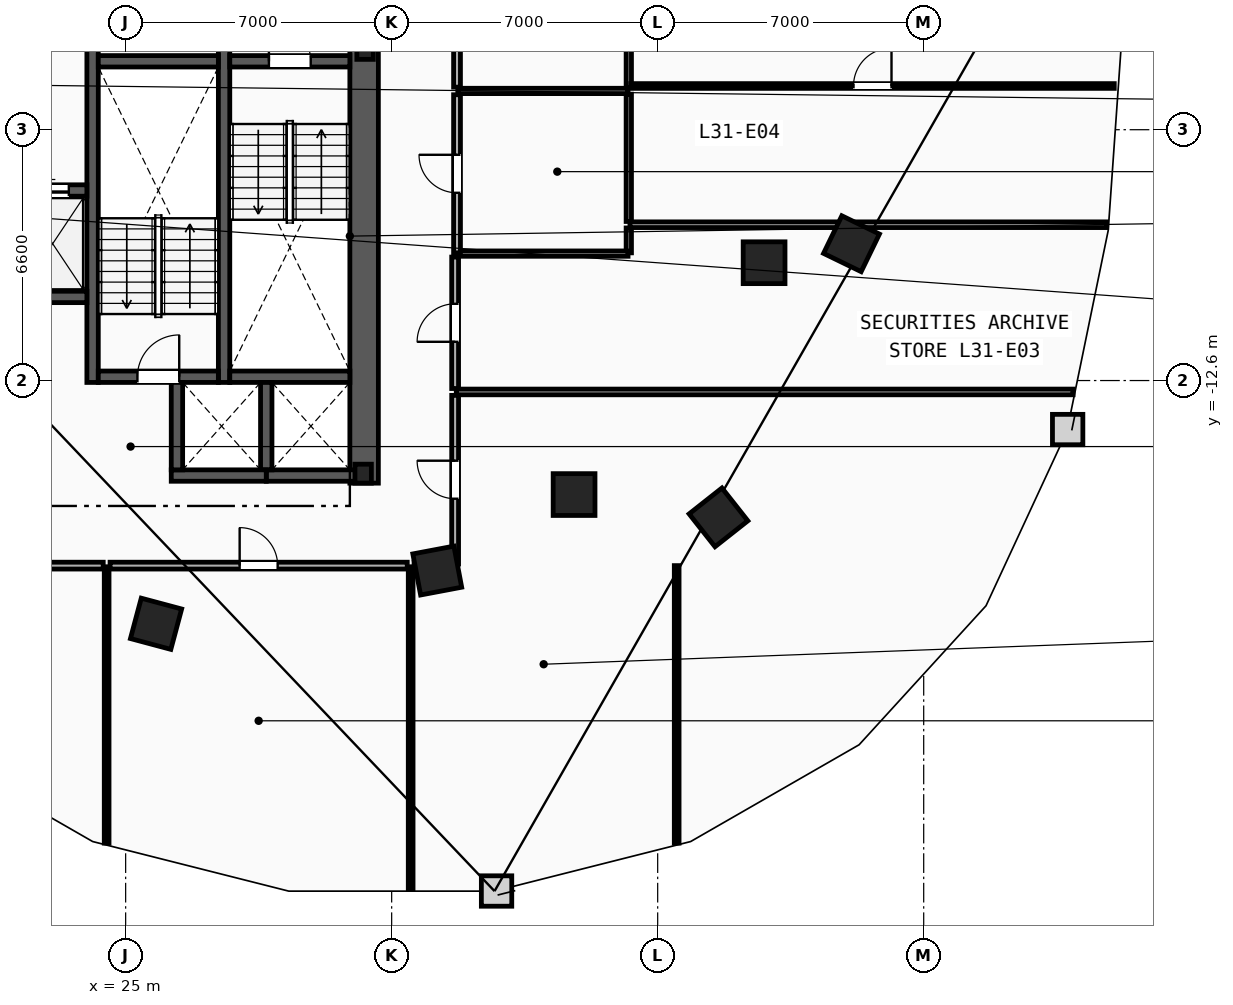
"""IFC4 building model, lengths in metres.
Left out: names, types, materials, properties, quantities, classifications, styles, units other than length and angle.
Written with IfcOpenShell. Run it as: python <this file> out.ifc"""

import sys

from ifc_helpers import new_model, si_unit, direction, frame, frame_2d, origin, origin_2d, place, context, subcontext, project, spatial, rectangle, i_section, extrude, element, fill, save


model = new_model("IFC4")
c1 = context("Model", 3, precision=1e-05, world=origin(), true_north=direction((0.0, 1.0)))
c2 = subcontext(c1, "Body", "Model", "MODEL_VIEW")
j1 = project(units=[si_unit("LENGTHUNIT", "METRE"), si_unit("PLANEANGLEUNIT", "RADIAN")], contexts=[c1])
p1 = place(None, origin())
s1 = spatial("IfcSite", under=j1, at=p1, CompositionType="ELEMENT")
p2 = place(p1, origin())
s2 = spatial("IfcBuilding", under=s1, at=p2, CompositionType="ELEMENT")
p3 = place(p2, frame((0.0, 0.0, 121.4)))
s3 = spatial("IfcBuildingStorey", under=s2, at=p3, CompositionType="ELEMENT", Elevation=121.4)
for number, where, z_axis, x_axis in (
    (1, (31.3, -3.9, 0.0), (0.0, 0.0, 1.0), (1.0, 0.0, 0.0)),
    (2, (31.25, -15.05, 0.0), (0.0, 0.0, 1.0), (1.0, 0.0, 0.0)),
):
    element("IfcColumn", number, at=place(p3, frame(where, z_axis=z_axis, x_axis=x_axis)), inside=s3, PredefinedType="COLUMN", context=c2, shape_type="SweptSolid", body=[
        extrude(i_section(OverallWidth=0.432, OverallDepth=0.498, WebThickness=0.056, FlangeThickness=0.089, FilletRadius=0.018, at=origin_2d()), origin(), (0.0, 0.0, 1.0), 3.6),
    ])
for number, where, z_axis, x_axis in (
    (3, (41.8, -9.5, 0.0), (0.0, 0.0, 1.0), (1.0, 0.0, 0.0)),
    (4, (36.8, -15.6, 0.0), (0.0, 0.0, 1.0), (1.0, 0.0, 0.0)),
    (5, (25.8, -19.0, 0.0), (0.0, 0.0, 1.0), (0.966, -0.259, 0.0)),
    (6, (33.2, -17.6, 0.0), (0.0, 0.0, 1.0), (0.983, 0.186, 0.0)),
    (7, (40.6, -16.2, 0.0), (0.0, 0.0, 1.0), (0.785, 0.619, 0.0)),
    (8, (44.1, -9.0, 0.0), (0.0, 0.0, 1.0), (0.437, 0.899, 0.0)),
):
    element("IfcColumn", number, at=place(p3, frame(where, z_axis=z_axis, x_axis=x_axis)), inside=s3, PredefinedType="COLUMN", context=c2, shape_type="SweptSolid", body=[
        extrude(rectangle(XDim=1.1, YDim=1.1, at=origin_2d()), origin(), (0.0, 0.0, 1.0), 3.6),
    ])
p4 = place(p3, frame((31.275, -15.3, 0.0), z_axis=(0.0, 0.0, 1.0), x_axis=(0.0, 1.0, 0.0)))
e9 = element("IfcWall", 9, at=p4, inside=s3, PredefinedType="SHEAR", context=c2, shape_type="SweptSolid", body=[
    extrude(rectangle(XDim=13.33, YDim=0.75, at=frame_2d((6.665, 0.0))), origin(), (0.0, 0.0, 1.0), 3.3),
])
for number, where, z_axis, x_axis in (
    (10, (27.59, -12.65, 0.0), (0.0, 0.0, 1.0), (0.0, 1.0, 0.0)),
    (11, (24.13, -12.65, 0.0), (0.0, 0.0, 1.0), (0.0, 1.0, 0.0)),
):
    element("IfcWall", number, at=place(p3, frame(where, z_axis=z_axis, x_axis=x_axis)), inside=s3, PredefinedType="SHEAR", context=c2, shape_type="SweptSolid", body=[
        extrude(rectangle(XDim=10.68, YDim=0.3, at=frame_2d((5.34, 0.0))), origin(), (0.0, 0.0, 1.0), 3.3),
    ])
p5 = place(p3, frame((27.74, -4.2, 0.0), z_axis=(0.0, 0.0, 1.0), x_axis=(1.0, 0.0, 0.0)))
e12 = element("IfcWall", 12, at=p5, inside=s3, PredefinedType="SHEAR", context=c2, shape_type="SweptSolid", body=[
    extrude(rectangle(XDim=3.16, YDim=0.3, at=frame_2d((1.58, 0.0))), origin(), (0.0, 0.0, 1.0), 3.3),
])
p6 = place(p5, frame((1.03, 0.0, 0.0)))
e13 = element("IfcOpeningElement", 13, at=p6, cuts=e12, PredefinedType="OPENING", context=c2, shape_type="SweptSolid", body=[
    extrude(rectangle(XDim=1.1, YDim=2.15, at=frame_2d((0.55, 1.075))), frame((0.0, 0.16, 0.0), z_axis=(0.0, -1.0, 0.0), x_axis=(1.0, 0.0, 0.0)), (0.0, 0.0, 1.0), 0.32),
])
p7 = place(p3, frame((27.74, -12.5, 0.0), z_axis=(0.0, 0.0, 1.0), x_axis=(1.0, 0.0, 0.0)))
e14 = element("IfcWall", 14, at=p7, inside=s3, PredefinedType="SHEAR", context=c2, shape_type="SweptSolid", body=[
    extrude(rectangle(XDim=3.16, YDim=0.3, at=frame_2d((1.58, 0.0))), origin(), (0.0, 0.0, 1.0), 3.3),
])
p8 = place(p3, frame((24.28, -12.5, 0.0), z_axis=(0.0, 0.0, 1.0), x_axis=(1.0, 0.0, 0.0)))
e15 = element("IfcWall", 15, at=p8, inside=s3, PredefinedType="SHEAR", context=c2, shape_type="SweptSolid", body=[
    extrude(rectangle(XDim=3.16, YDim=0.3, at=frame_2d((1.58, 0.0))), origin(), (0.0, 0.0, 1.0), 3.3),
])
p9 = place(p8, frame((1.03, 0.0, 0.0)))
e16 = element("IfcOpeningElement", 16, at=p9, cuts=e15, PredefinedType="OPENING", context=c2, shape_type="SweptSolid", body=[
    extrude(rectangle(XDim=1.1, YDim=2.15, at=frame_2d((0.55, 1.075))), frame((0.0, 0.16, 0.0), z_axis=(0.0, -1.0, 0.0), x_axis=(1.0, 0.0, 0.0)), (0.0, 0.0, 1.0), 0.32),
])
p10 = place(p3, frame((24.28, -4.2, 0.0), z_axis=(0.0, 0.0, 1.0), x_axis=(1.0, 0.0, 0.0)))
e17 = element("IfcWall", 17, at=p10, inside=s3, PredefinedType="SHEAR", context=c2, shape_type="SweptSolid", body=[
    extrude(rectangle(XDim=3.16, YDim=0.3, at=frame_2d((1.58, 0.0))), origin(), (0.0, 0.0, 1.0), 3.3),
])
p11 = place(p3, frame((21.88, -7.6, 0.0), z_axis=(0.0, 0.0, 1.0), x_axis=(1.0, 0.0, 0.0)))
e18 = element("IfcWall", 18, at=p11, inside=s3, PredefinedType="SHEAR", context=c2, shape_type="SweptSolid", body=[
    extrude(rectangle(XDim=2.1, YDim=0.3, at=frame_2d((1.05, 0.0))), origin(), (0.0, 0.0, 1.0), 3.3),
])
p12 = place(p11, frame((0.475, 0.0, 0.0)))
e19 = element("IfcOpeningElement", 19, at=p12, cuts=e18, PredefinedType="OPENING", context=c2, shape_type="SweptSolid", body=[
    extrude(rectangle(XDim=1.15, YDim=2.2, at=frame_2d((0.575, 1.1))), frame((0.0, 0.16, 0.0), z_axis=(0.0, -1.0, 0.0), x_axis=(1.0, 0.0, 0.0)), (0.0, 0.0, 1.0), 0.32),
])
p13 = place(p3, frame((21.88, -10.4, 0.0), z_axis=(0.0, 0.0, 1.0), x_axis=(1.0, 0.0, 0.0)))
e20 = element("IfcWall", 20, at=p13, inside=s3, PredefinedType="SHEAR", context=c2, shape_type="SweptSolid", body=[
    extrude(rectangle(XDim=2.1, YDim=0.3, at=frame_2d((1.05, 0.0))), origin(), (0.0, 0.0, 1.0), 3.3),
])
p14 = place(p3, frame((28.7, -15.1, 0.0), z_axis=(0.0, 0.0, 1.0), x_axis=(1.0, 0.0, 0.0)))
e21 = element("IfcWall", 21, at=p14, inside=s3, PredefinedType="SHEAR", context=c2, shape_type="SweptSolid", body=[
    extrude(rectangle(XDim=2.5, YDim=0.3, at=frame_2d((1.25, 0.0))), origin(), (0.0, 0.0, 1.0), 3.3),
])
p15 = place(p3, frame((28.7, -14.95, 0.0), z_axis=(0.0, 0.0, 1.0), x_axis=(0.0, 1.0, 0.0)))
e22 = element("IfcWall", 22, at=p15, inside=s3, PredefinedType="SHEAR", context=c2, shape_type="SweptSolid", body=[
    extrude(rectangle(XDim=2.3, YDim=0.3, at=frame_2d((1.15, 0.0))), origin(), (0.0, 0.0, 1.0), 3.3),
])
p16 = place(p3, frame((26.2, -15.1, 0.0), z_axis=(0.0, 0.0, 1.0), x_axis=(1.0, 0.0, 0.0)))
e23 = element("IfcWall", 23, at=p16, inside=s3, PredefinedType="SHEAR", context=c2, shape_type="SweptSolid", body=[
    extrude(rectangle(XDim=2.5, YDim=0.3, at=frame_2d((1.25, 0.0))), origin(), (0.0, 0.0, 1.0), 3.3),
])
p17 = place(p3, frame((26.35, -14.95, 0.0), z_axis=(0.0, 0.0, 1.0), x_axis=(0.0, 1.0, 0.0)))
e24 = element("IfcWall", 24, at=p17, inside=s3, PredefinedType="SHEAR", context=c2, shape_type="SweptSolid", body=[
    extrude(rectangle(XDim=2.3, YDim=0.3, at=frame_2d((1.15, 0.0))), origin(), (0.0, 0.0, 1.0), 3.3),
])
p18 = place(p3, frame((38.24, -9.24, 0.0), z_axis=(0.0, 0.0, 1.0), x_axis=(0.0, 1.0, 0.0)))
e25 = element("IfcWall", 25, at=p18, inside=s3, PredefinedType="PARTITIONING", context=c2, shape_type="SweptSolid", body=[
    extrude(rectangle(XDim=0.655, YDim=0.14, at=frame_2d((0.328, 0.0))), origin(), (0.0, 0.0, 1.0), 3.3),
])
p19 = place(p3, frame((38.24, -8.415, 0.0), z_axis=(0.0, 0.0, 1.0), x_axis=(0.0, 1.0, 0.0)))
e26 = element("IfcWall", 26, at=p19, inside=s3, PredefinedType="PARTITIONING", context=c2, shape_type="SweptSolid", body=[
    extrude(rectangle(XDim=3.35, YDim=0.14, at=frame_2d((1.675, 0.0))), origin(), (0.0, 0.0, 1.0), 3.3),
])
p20 = place(p3, frame((38.24, -4.895, 0.0), z_axis=(0.0, 0.0, 1.0), x_axis=(0.0, 1.0, 0.0)))
e27 = element("IfcWall", 27, at=p20, inside=s3, PredefinedType="PARTITIONING", context=c2, shape_type="SweptSolid", body=[
    extrude(rectangle(XDim=4.275, YDim=0.14, at=frame_2d((2.137, 0.0))), origin(), (0.0, 0.0, 1.0), 3.3),
])
for number, where, z_axis, x_axis in (
    (28, (33.74, -4.98, 0.0), (0.0, 0.0, 1.0), (1.0, 0.0, 0.0)),
    (29, (33.74, -9.26, 0.0), (0.0, 0.0, 1.0), (1.0, 0.0, 0.0)),
):
    element("IfcWall", number, at=place(p3, frame(where, z_axis=z_axis, x_axis=x_axis)), inside=s3, PredefinedType="PARTITIONING", context=c2, shape_type="SweptSolid", body=[
        extrude(rectangle(XDim=4.48, YDim=0.14, at=frame_2d((2.24, 0.0))), origin(), (0.0, 0.0, 1.0), 3.3),
    ])
p21 = place(p3, frame((33.72, -4.88, 0.0), z_axis=(0.0, 0.0, 1.0), x_axis=(0.0, 1.0, 0.0)))
e30 = element("IfcWall", 30, at=p21, inside=s3, PredefinedType="PARTITIONING", context=c2, shape_type="SweptSolid", body=[
    extrude(rectangle(XDim=4.26, YDim=0.18, at=frame_2d((2.13, 0.0))), origin(), (0.0, 0.0, 1.0), 3.3),
])
p22 = place(p21, frame((1.655, 0.0, 0.0)))
e31 = element("IfcOpeningElement", 31, at=p22, cuts=e30, PredefinedType="OPENING", context=c2, shape_type="SweptSolid", body=[
    extrude(rectangle(XDim=0.95, YDim=2.1, at=frame_2d((0.475, 1.05))), frame((0.0, 0.1, 0.0), z_axis=(0.0, -1.0, 0.0), x_axis=(1.0, 0.0, 0.0)), (0.0, 0.0, 1.0), 0.2),
])
p23 = place(p3, frame((33.72, -9.24, 0.0), z_axis=(0.0, 0.0, 1.0), x_axis=(0.0, 1.0, 0.0)))
e32 = element("IfcWall", 32, at=p23, inside=s3, PredefinedType="PARTITIONING", context=c2, shape_type="SweptSolid", body=[
    extrude(rectangle(XDim=4.16, YDim=0.18, at=frame_2d((2.08, 0.0))), origin(), (0.0, 0.0, 1.0), 3.3),
])
p24 = place(p23, frame((1.58, 0.0, 0.0)))
e33 = element("IfcOpeningElement", 33, at=p24, cuts=e32, PredefinedType="OPENING", context=c2, shape_type="SweptSolid", body=[
    extrude(rectangle(XDim=1.0, YDim=2.15, at=frame_2d((0.5, 1.075))), frame((0.0, 0.1, 0.0), z_axis=(0.0, -1.0, 0.0), x_axis=(1.0, 0.0, 0.0)), (0.0, 0.0, 1.0), 0.2),
])
p25 = place(p3, frame((38.27, -8.5, 0.0), z_axis=(0.0, 0.0, 1.0), x_axis=(1.0, 0.0, 0.0)))
e34 = element("IfcWall", 34, at=p25, inside=s3, PredefinedType="PARTITIONING", context=c2, shape_type="SweptSolid", body=[
    extrude(rectangle(XDim=12.546, YDim=0.15, at=frame_2d((6.273, 0.0))), origin(), (0.0, 0.0, 1.0), 3.3),
])
p26 = place(p3, frame((33.7, -12.9, 0.0), z_axis=(0.0, 0.0, 1.0), x_axis=(1.0, 0.0, 0.0)))
e35 = element("IfcWall", 35, at=p26, inside=s3, PredefinedType="PARTITIONING", context=c2, shape_type="SweptSolid", body=[
    extrude(rectangle(XDim=16.231, YDim=0.15, at=frame_2d((8.115, 0.0))), origin(), (0.0, 0.0, 1.0), 3.3),
])
p27 = place(p3, frame((24.5, -24.772, 0.0), z_axis=(0.0, 0.0, 1.0), x_axis=(0.0, 1.0, 0.0)))
e36 = element("IfcWall", 36, at=p27, inside=s3, PredefinedType="PARTITIONING", context=c2, shape_type="SweptSolid", body=[
    extrude(rectangle(XDim=7.272, YDim=0.125, at=frame_2d((3.636, 0.0))), origin(), (0.0, 0.0, 1.0), 3.3),
])
p28 = place(p3, frame((32.5, -25.985, 0.0), z_axis=(0.0, 0.0, 1.0), x_axis=(0.0, 1.0, 0.0)))
e37 = element("IfcWall", 37, at=p28, inside=s3, PredefinedType="PARTITIONING", context=c2, shape_type="SweptSolid", body=[
    extrude(rectangle(XDim=8.485, YDim=0.125, at=frame_2d((4.243, 0.0))), origin(), (0.0, 0.0, 1.0), 3.3),
])
p29 = place(p3, frame((39.5, -24.772, 0.0), z_axis=(0.0, 0.0, 1.0), x_axis=(0.0, 1.0, 0.0)))
e38 = element("IfcWall", 38, at=p29, inside=s3, PredefinedType="PARTITIONING", context=c2, shape_type="SweptSolid", body=[
    extrude(rectangle(XDim=7.302, YDim=0.125, at=frame_2d((3.651, 0.0))), origin(), (0.0, 0.0, 1.0), 3.3),
])
p30 = place(p3, frame((24.59, -17.47, 0.0), z_axis=(0.0, 0.0, 1.0), x_axis=(1.0, 0.0, 0.0)))
e39 = element("IfcWall", 39, at=p30, inside=s3, PredefinedType="PARTITIONING", context=c2, shape_type="SweptSolid", body=[
    extrude(rectangle(XDim=7.82, YDim=0.18, at=frame_2d((3.91, 0.0))), origin(), (0.0, 0.0, 1.0), 3.3),
])
p31 = place(p30, frame((3.41, 0.0, 0.0)))
e40 = element("IfcOpeningElement", 40, at=p31, cuts=e39, PredefinedType="OPENING", context=c2, shape_type="SweptSolid", body=[
    extrude(rectangle(XDim=1.0, YDim=2.15, at=frame_2d((0.5, 1.075))), frame((0.0, 0.1, 0.0), z_axis=(0.0, -1.0, 0.0), x_axis=(1.0, 0.0, 0.0)), (0.0, 0.0, 1.0), 0.2),
])
p32 = place(p3, frame((33.67, -17.428, 0.0), z_axis=(0.0, 0.0, 1.0), x_axis=(0.0, 1.0, 0.0)))
e41 = element("IfcWall", 41, at=p32, inside=s3, PredefinedType="PARTITIONING", context=c2, shape_type="SweptSolid", body=[
    extrude(rectangle(XDim=4.438, YDim=0.18, at=frame_2d((2.219, 0.0))), origin(), (0.0, 0.0, 1.0), 3.3),
])
p33 = place(p32, frame((1.719, 0.0, 0.0)))
e42 = element("IfcOpeningElement", 42, at=p33, cuts=e41, PredefinedType="OPENING", context=c2, shape_type="SweptSolid", body=[
    extrude(rectangle(XDim=1.0, YDim=2.15, at=frame_2d((0.5, 1.075))), frame((0.0, 0.1, 0.0), z_axis=(0.0, -1.0, 0.0), x_axis=(1.0, 0.0, 0.0)), (0.0, 0.0, 1.0), 0.2),
])
p34 = place(p3, frame((32.59, -17.47, 0.0), z_axis=(0.0, 0.0, 1.0), x_axis=(1.0, 0.0, 0.0)))
e43 = element("IfcWall", 43, at=p34, inside=s3, PredefinedType="PARTITIONING", context=c2, shape_type="SweptSolid", body=[
    extrude(rectangle(XDim=1.038, YDim=0.18, at=frame_2d((0.519, 0.0))), origin(), (0.0, 0.0, 1.0), 3.3),
])
p35 = place(p3, frame((33.67, -12.81, 0.0), z_axis=(0.0, 0.0, 1.0), x_axis=(0.0, 1.0, 0.0)))
e44 = element("IfcWall", 44, at=p35, inside=s3, PredefinedType="PARTITIONING", context=c2, shape_type="SweptSolid", body=[
    extrude(rectangle(XDim=3.459, YDim=0.18, at=frame_2d((1.729, 0.0))), origin(), (0.0, 0.0, 1.0), 3.3),
])
p36 = place(p35, frame((1.229, 0.0, 0.0)))
e45 = element("IfcOpeningElement", 45, at=p36, cuts=e44, PredefinedType="OPENING", context=c2, shape_type="SweptSolid", body=[
    extrude(rectangle(XDim=1.0, YDim=2.15, at=frame_2d((0.5, 1.075))), frame((0.0, 0.1, 0.0), z_axis=(0.0, -1.0, 0.0), x_axis=(1.0, 0.0, 0.0)), (0.0, 0.0, 1.0), 0.2),
])
p37 = place(p3, frame((16.822, -17.47, 0.0), z_axis=(0.0, 0.0, 1.0), x_axis=(1.0, 0.0, 0.0)))
e46 = element("IfcWall", 46, at=p37, inside=s3, PredefinedType="PARTITIONING", context=c2, shape_type="SweptSolid", body=[
    extrude(rectangle(XDim=7.588, YDim=0.18, at=frame_2d((3.794, 0.0))), origin(), (0.0, 0.0, 1.0), 3.3),
])
p38 = place(p3, frame((38.292, -4.85, 0.0), z_axis=(0.0, 0.0, 1.0), x_axis=(1.0, 0.0, 0.0)))
e47 = element("IfcWall", 47, at=p38, inside=s3, PredefinedType="PARTITIONING", context=c2, shape_type="SweptSolid", body=[
    extrude(rectangle(XDim=12.723, YDim=0.125, at=frame_2d((6.361, 0.0))), origin(), (0.0, 0.0, 1.0), 3.3),
])
p39 = place(p38, frame((5.861, 0.0, 0.0)))
e48 = element("IfcOpeningElement", 48, at=p39, cuts=e47, PredefinedType="OPENING", context=c2, shape_type="SweptSolid", body=[
    extrude(rectangle(XDim=1.0, YDim=2.15, at=frame_2d((0.5, 1.075))), frame((0.0, 0.073, 0.0), z_axis=(0.0, -1.0, 0.0), x_axis=(1.0, 0.0, 0.0)), (0.0, 0.0, 1.0), 0.145),
])
p40 = place(p6, origin())
e49 = element("IfcDoor", 49, at=p40, inside=s3, OperationType="SINGLE_SWING_LEFT", PredefinedType="DOOR", context=c2, shape_type="SweptSolid", body=[
    extrude(rectangle(XDim=1.1, YDim=2.15, at=frame_2d((0.55, 1.075))), frame((0.0, 0.025, 0.0), z_axis=(0.0, -1.0, 0.0), x_axis=(1.0, 0.0, 0.0)), (0.0, 0.0, 1.0), 0.05),
])
fill(e13, e49)
p41 = place(p9, origin())
e50 = element("IfcDoor", 50, at=p41, inside=s3, OperationType="SINGLE_SWING_RIGHT", PredefinedType="DOOR", context=c2, shape_type="SweptSolid", body=[
    extrude(rectangle(XDim=1.1, YDim=2.15, at=frame_2d((0.55, 1.075))), frame((0.0, 0.025, 0.0), z_axis=(0.0, -1.0, 0.0), x_axis=(1.0, 0.0, 0.0)), (0.0, 0.0, 1.0), 0.05),
])
fill(e16, e50)
p42 = place(p12, origin())
e51 = element("IfcDoor", 51, at=p42, inside=s3, OperationType="SLIDING_TO_LEFT", PredefinedType="TRAPDOOR", context=c2, shape_type="SweptSolid", body=[
    extrude(rectangle(XDim=1.15, YDim=2.2, at=frame_2d((0.575, 1.1))), frame((0.0, 0.025, 0.0), z_axis=(0.0, -1.0, 0.0), x_axis=(1.0, 0.0, 0.0)), (0.0, 0.0, 1.0), 0.05),
])
fill(e19, e51)
p43 = place(p39, origin())
e52 = element("IfcDoor", 52, at=p43, inside=s3, OperationType="SINGLE_SWING_RIGHT", PredefinedType="DOOR", context=c2, shape_type="SweptSolid", body=[
    extrude(rectangle(XDim=1.0, YDim=2.15, at=frame_2d((0.5, 1.075))), frame((0.0, 0.025, 0.0), z_axis=(0.0, -1.0, 0.0), x_axis=(1.0, 0.0, 0.0)), (0.0, 0.0, 1.0), 0.05),
])
fill(e48, e52)
p44 = place(p31, origin())
e53 = element("IfcDoor", 53, at=p44, inside=s3, OperationType="SINGLE_SWING_LEFT", PredefinedType="DOOR", context=c2, shape_type="SweptSolid", body=[
    extrude(rectangle(XDim=1.0, YDim=2.15, at=frame_2d((0.5, 1.075))), frame((0.0, 0.025, 0.0), z_axis=(0.0, -1.0, 0.0), x_axis=(1.0, 0.0, 0.0)), (0.0, 0.0, 1.0), 0.05),
])
fill(e40, e53)
p45 = place(p33, origin())
e54 = element("IfcDoor", 54, at=p45, inside=s3, OperationType="SINGLE_SWING_RIGHT", PredefinedType="DOOR", context=c2, shape_type="SweptSolid", body=[
    extrude(rectangle(XDim=1.0, YDim=2.15, at=frame_2d((0.5, 1.075))), frame((0.0, 0.025, 0.0), z_axis=(0.0, -1.0, 0.0), x_axis=(1.0, 0.0, 0.0)), (0.0, 0.0, 1.0), 0.05),
])
fill(e42, e54)
p46 = place(p24, origin())
e55 = element("IfcDoor", 55, at=p46, inside=s3, OperationType="SINGLE_SWING_RIGHT", PredefinedType="DOOR", context=c2, shape_type="SweptSolid", body=[
    extrude(rectangle(XDim=1.0, YDim=2.15, at=frame_2d((0.5, 1.075))), frame((0.0, 0.025, 0.0), z_axis=(0.0, -1.0, 0.0), x_axis=(1.0, 0.0, 0.0)), (0.0, 0.0, 1.0), 0.05),
])
fill(e33, e55)
p47 = place(p36, origin())
e56 = element("IfcDoor", 56, at=p47, inside=s3, OperationType="SINGLE_SWING_LEFT", PredefinedType="DOOR", context=c2, shape_type="SweptSolid", body=[
    extrude(rectangle(XDim=1.0, YDim=2.15, at=frame_2d((0.5, 1.075))), frame((0.0, 0.025, 0.0), z_axis=(0.0, -1.0, 0.0), x_axis=(1.0, 0.0, 0.0)), (0.0, 0.0, 1.0), 0.05),
])
fill(e45, e56)
save(model, sys.argv[1])
